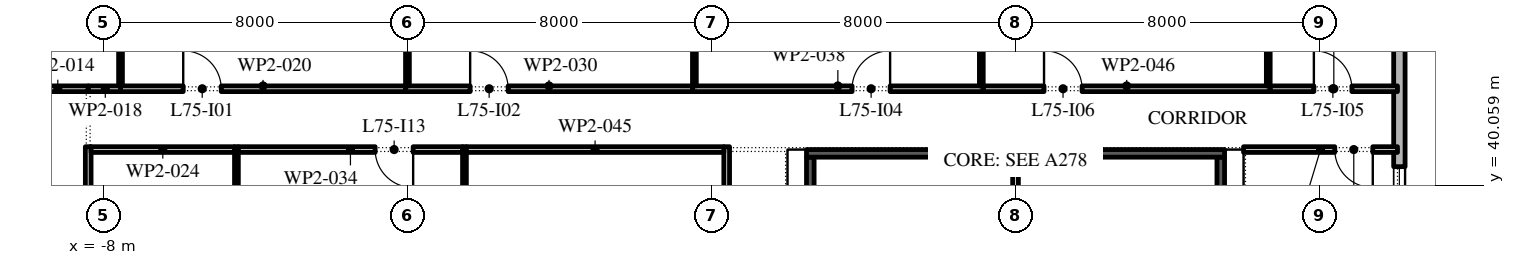
"""IFC4 building model, lengths in metres.
Left out: names, types, materials, properties, quantities, classifications, styles, units other than length and angle.
Written with IfcOpenShell. Run it as: python <this file> out.ifc"""

import sys

from ifc_helpers import new_model, si_unit, direction, frame, frame_2d, origin, place, context, subcontext, project, spatial, rectangle, extrude, element, fill, save


model = new_model("IFC4")
c1 = context("Model", 3, precision=1e-05, world=origin(), true_north=direction((0.0, 1.0)))
c2 = subcontext(c1, "Body", "Model", "MODEL_VIEW")
j1 = project(units=[si_unit("LENGTHUNIT", "METRE"), si_unit("PLANEANGLEUNIT", "RADIAN")], contexts=[c1])
p1 = place(None, origin())
s1 = spatial("IfcSite", under=j1, at=p1, CompositionType="ELEMENT")
p2 = place(p1, origin())
s2 = spatial("IfcBuilding", under=s1, at=p2, CompositionType="ELEMENT")
p3 = place(p2, frame((0.0, 0.0, 342.6)))
s3 = spatial("IfcBuildingStorey", under=s2, at=p3, CompositionType="ELEMENT", Elevation=342.6)
p4 = place(p3, frame((26.1, -2.1, 0.0), z_axis=(0.0, 0.0, 1.0), x_axis=(0.0, 1.0, 0.0)))
e1 = element("IfcWall", 1, at=p4, inside=s3, PredefinedType="STANDARD", context=c2, shape_type="SweptSolid", body=[
    extrude(rectangle(XDim=51.5, YDim=0.3, at=frame_2d((25.75, 0.0))), origin(), (0.0, 0.0, 1.0), 4.0),
])
p5 = place(p4, frame((1.3, 0.0, 0.45)))
e2 = element("IfcOpeningElement", 2, at=p5, cuts=e1, PredefinedType="OPENING", context=c2, shape_type="SweptSolid", body=[
    extrude(rectangle(XDim=4.5, YDim=3.05, at=frame_2d((2.25, 1.525))), frame((0.0, 0.16, 0.0), z_axis=(0.0, -1.0, 0.0), x_axis=(1.0, 0.0, 0.0)), (0.0, 0.0, 1.0), 0.32),
])
p6 = place(p4, frame((8.55, 0.0, 0.45)))
e3 = element("IfcOpeningElement", 3, at=p6, cuts=e1, PredefinedType="OPENING", context=c2, shape_type="SweptSolid", body=[
    extrude(rectangle(XDim=4.5, YDim=3.05, at=frame_2d((2.25, 1.525))), frame((0.0, 0.16, 0.0), z_axis=(0.0, -1.0, 0.0), x_axis=(1.0, 0.0, 0.0)), (0.0, 0.0, 1.0), 0.32),
])
p7 = place(p4, frame((17.0, 0.0, 0.0)))
e4 = element("IfcOpeningElement", 4, at=p7, cuts=e1, PredefinedType="OPENING", context=c2, shape_type="SweptSolid", body=[
    extrude(rectangle(XDim=2.4, YDim=3.5, at=frame_2d((1.2, 1.75))), frame((0.0, 0.16, 0.0), z_axis=(0.0, -1.0, 0.0), x_axis=(1.0, 0.0, 0.0)), (0.0, 0.0, 1.0), 0.32),
])
p8 = place(p4, frame((23.35, 0.0, 0.45)))
e5 = element("IfcOpeningElement", 5, at=p8, cuts=e1, PredefinedType="OPENING", context=c2, shape_type="SweptSolid", body=[
    extrude(rectangle(XDim=4.5, YDim=3.05, at=frame_2d((2.25, 1.525))), frame((0.0, 0.16, 0.0), z_axis=(0.0, -1.0, 0.0), x_axis=(1.0, 0.0, 0.0)), (0.0, 0.0, 1.0), 0.32),
])
p9 = place(p4, frame((30.75, 0.0, 0.45)))
e6 = element("IfcOpeningElement", 6, at=p9, cuts=e1, PredefinedType="OPENING", context=c2, shape_type="SweptSolid", body=[
    extrude(rectangle(XDim=4.5, YDim=3.05, at=frame_2d((2.25, 1.525))), frame((0.0, 0.16, 0.0), z_axis=(0.0, -1.0, 0.0), x_axis=(1.0, 0.0, 0.0)), (0.0, 0.0, 1.0), 0.32),
])
p10 = place(p4, frame((38.15, 0.0, 0.45)))
e7 = element("IfcOpeningElement", 7, at=p10, cuts=e1, PredefinedType="OPENING", context=c2, shape_type="SweptSolid", body=[
    extrude(rectangle(XDim=4.5, YDim=3.05, at=frame_2d((2.25, 1.525))), frame((0.0, 0.16, 0.0), z_axis=(0.0, -1.0, 0.0), x_axis=(1.0, 0.0, 0.0)), (0.0, 0.0, 1.0), 0.32),
])
p11 = place(p4, frame((46.6, 0.0, 0.0)))
e8 = element("IfcOpeningElement", 8, at=p11, cuts=e1, PredefinedType="OPENING", context=c2, shape_type="SweptSolid", body=[
    extrude(rectangle(XDim=2.4, YDim=3.5, at=frame_2d((1.2, 1.75))), frame((0.0, 0.16, 0.0), z_axis=(0.0, -1.0, 0.0), x_axis=(1.0, 0.0, 0.0)), (0.0, 0.0, 1.0), 0.32),
])
p12 = place(p3, frame((21.4, 25.75, 0.0), z_axis=(0.0, 0.0, 1.0), x_axis=(0.0, 1.0, 0.0)))
e9 = element("IfcWall", 9, at=p12, inside=s3, PredefinedType="SHEAR", context=c2, shape_type="SweptSolid", body=[
    extrude(rectangle(XDim=15.05, YDim=0.2, at=frame_2d((7.525, 0.0))), origin(), (0.0, 0.0, 1.0), 4.0),
])
p13 = place(p12, frame((7.075, 0.0, 0.0)))
e10 = element("IfcOpeningElement", 10, at=p13, cuts=e9, PredefinedType="OPENING", context=c2, shape_type="SweptSolid", body=[
    extrude(rectangle(XDim=0.9, YDim=2.1, at=frame_2d((0.45, 1.05))), frame((0.0, 0.11, 0.0), z_axis=(0.0, -1.0, 0.0), x_axis=(1.0, 0.0, 0.0)), (0.0, 0.0, 1.0), 0.22),
])
p14 = place(p3, frame((10.6, 25.75, 0.0), z_axis=(0.0, 0.0, 1.0), x_axis=(0.0, 1.0, 0.0)))
e11 = element("IfcWall", 11, at=p14, inside=s3, PredefinedType="SHEAR", context=c2, shape_type="SweptSolid", body=[
    extrude(rectangle(XDim=15.05, YDim=0.2, at=frame_2d((7.525, 0.0))), origin(), (0.0, 0.0, 1.0), 4.0),
])
p15 = place(p14, frame((3.288, 0.0, 0.0)))
e12 = element("IfcOpeningElement", 12, at=p15, cuts=e11, PredefinedType="OPENING", context=c2, shape_type="SweptSolid", body=[
    extrude(rectangle(XDim=0.9, YDim=2.1, at=frame_2d((0.45, 1.05))), frame((0.0, 0.11, 0.0), z_axis=(0.0, -1.0, 0.0), x_axis=(1.0, 0.0, 0.0)), (0.0, 0.0, 1.0), 0.22),
])
p16 = place(p14, frame((10.887, 0.0, 0.0)))
e13 = element("IfcOpeningElement", 13, at=p16, cuts=e11, PredefinedType="OPENING", context=c2, shape_type="SweptSolid", body=[
    extrude(rectangle(XDim=0.9, YDim=2.1, at=frame_2d((0.45, 1.05))), frame((0.0, 0.11, 0.0), z_axis=(0.0, -1.0, 0.0), x_axis=(1.0, 0.0, 0.0)), (0.0, 0.0, 1.0), 0.22),
])
p17 = place(p3, frame((10.5, 40.9, 0.0), z_axis=(0.0, 0.0, 1.0), x_axis=(1.0, 0.0, 0.0)))
e14 = element("IfcWall", 14, at=p17, inside=s3, PredefinedType="SHEAR", context=c2, shape_type="SweptSolid", body=[
    extrude(rectangle(XDim=11.0, YDim=0.2, at=frame_2d((5.5, 0.0))), origin(), (0.0, 0.0, 1.0), 4.0),
])
p18 = place(p3, frame((16.0, 25.75, 0.0), z_axis=(0.0, 0.0, 1.0), x_axis=(0.0, 1.0, 0.0)))
e15 = element("IfcWall", 15, at=p18, inside=s3, PredefinedType="PARTITIONING", context=c2, shape_type="SweptSolid", body=[
    extrude(rectangle(XDim=15.05, YDim=0.15, at=frame_2d((7.525, 0.0))), origin(), (0.0, 0.0, 1.0), 4.0),
])
p19 = place(p3, frame((-10.0, 42.6, 0.0), z_axis=(0.0, 0.0, 1.0), x_axis=(1.0, 0.0, 0.0)))
e16 = element("IfcWall", 16, at=p19, inside=s3, PredefinedType="PARTITIONING", context=c2, shape_type="SweptSolid", body=[
    extrude(rectangle(XDim=1.6, YDim=0.15, at=frame_2d((0.8, 0.0))), origin(), (0.0, 0.0, 1.0), 4.0),
])
p20 = place(p3, frame((-8.4, 41.075, 0.0), z_axis=(0.0, 0.0, 1.0), x_axis=(0.0, -1.0, 0.0)))
e17 = element("IfcWall", 17, at=p20, inside=s3, PredefinedType="PARTITIONING", context=c2, shape_type="SweptSolid", body=[
    extrude(rectangle(XDim=9.025, YDim=0.15, at=frame_2d((4.512, 0.0))), origin(), (0.0, 0.0, 1.0), 4.0),
])
p21 = place(p20, frame((2.175, 0.0, 0.0)))
e18 = element("IfcOpeningElement", 18, at=p21, cuts=e17, PredefinedType="OPENING", context=c2, shape_type="SweptSolid", body=[
    extrude(rectangle(XDim=1.0, YDim=2.1, at=frame_2d((0.5, 1.05))), frame((0.0, 0.085, 0.0), z_axis=(0.0, -1.0, 0.0), x_axis=(1.0, 0.0, 0.0)), (0.0, 0.0, 1.0), 0.17),
])
p22 = place(p3, frame((-8.4, 42.6, 0.0), z_axis=(0.0, 0.0, 1.0), x_axis=(1.0, 0.0, 0.0)))
e19 = element("IfcWall", 19, at=p22, inside=s3, PredefinedType="PARTITIONING", context=c2, shape_type="SweptSolid", body=[
    extrude(rectangle(XDim=0.9, YDim=0.15, at=frame_2d((0.45, 0.0))), origin(), (0.0, 0.0, 1.0), 4.0),
])
p23 = place(p3, frame((-7.55, 42.675, 0.0), z_axis=(0.0, 0.0, 1.0), x_axis=(0.0, 1.0, 0.0)))
e20 = element("IfcWall", 20, at=p23, inside=s3, PredefinedType="PARTITIONING", context=c2, shape_type="SweptSolid", body=[
    extrude(rectangle(XDim=4.775, YDim=0.1, at=frame_2d((2.387, 0.0))), origin(), (0.0, 0.0, 1.0), 3.096),
])
p24 = place(p3, frame((-7.55, 42.6, 0.0), z_axis=(0.0, 0.0, 1.0), x_axis=(1.0, 0.0, 0.0)))
e21 = element("IfcWall", 21, at=p24, inside=s3, PredefinedType="PARTITIONING", context=c2, shape_type="SweptSolid", body=[
    extrude(rectangle(XDim=7.5, YDim=0.15, at=frame_2d((3.75, 0.0))), origin(), (0.0, 0.0, 1.0), 4.0),
])
p25 = place(p24, frame((1.65, 0.0, 0.0)))
e22 = element("IfcOpeningElement", 22, at=p25, cuts=e21, PredefinedType="OPENING", context=c2, shape_type="SweptSolid", body=[
    extrude(rectangle(XDim=1.0, YDim=2.1, at=frame_2d((0.5, 1.05))), frame((0.0, 0.085, 0.0), z_axis=(0.0, -1.0, 0.0), x_axis=(1.0, 0.0, 0.0)), (0.0, 0.0, 1.0), 0.17),
])
p26 = place(p3, frame((-4.5, 32.05, 0.0), z_axis=(0.0, 0.0, 1.0), x_axis=(0.0, 1.0, 0.0)))
e23 = element("IfcWall", 23, at=p26, inside=s3, PredefinedType="PARTITIONING", context=c2, shape_type="SweptSolid", body=[
    extrude(rectangle(XDim=9.025, YDim=0.1, at=frame_2d((4.512, 0.0))), origin(), (0.0, 0.0, 1.0), 4.0),
])
p27 = place(p3, frame((-4.55, 41.0, 0.0), z_axis=(0.0, 0.0, 1.0), x_axis=(-1.0, 0.0, 0.0)))
e24 = element("IfcWall", 24, at=p27, inside=s3, PredefinedType="PARTITIONING", context=c2, shape_type="SweptSolid", body=[
    extrude(rectangle(XDim=3.775, YDim=0.15, at=frame_2d((1.887, 0.0))), origin(), (0.0, 0.0, 1.0), 4.0),
])
p28 = place(p3, frame((-0.05, 42.6, 0.0), z_axis=(0.0, 0.0, 1.0), x_axis=(1.0, 0.0, 0.0)))
e25 = element("IfcWall", 25, at=p28, inside=s3, PredefinedType="PARTITIONING", context=c2, shape_type="SweptSolid", body=[
    extrude(rectangle(XDim=7.55, YDim=0.15, at=frame_2d((3.775, 0.0))), origin(), (0.0, 0.0, 1.0), 4.0),
])
p29 = place(p28, frame((1.7, 0.0, 0.0)))
e26 = element("IfcOpeningElement", 26, at=p29, cuts=e25, PredefinedType="OPENING", context=c2, shape_type="SweptSolid", body=[
    extrude(rectangle(XDim=1.0, YDim=2.1, at=frame_2d((0.5, 1.05))), frame((0.0, 0.085, 0.0), z_axis=(0.0, -1.0, 0.0), x_axis=(1.0, 0.0, 0.0)), (0.0, 0.0, 1.0), 0.17),
])
p30 = place(p3, frame((0.0, 52.8, 0.0), z_axis=(0.0, 0.0, 1.0), x_axis=(0.0, -1.0, 0.0)))
e27 = element("IfcWall", 27, at=p30, inside=s3, PredefinedType="PARTITIONING", context=c2, shape_type="SweptSolid", body=[
    extrude(rectangle(XDim=10.125, YDim=0.1, at=frame_2d((5.062, 0.0))), origin(), (0.0, 0.0, 1.0), 4.0),
])
p31 = place(p3, frame((1.5, 32.05, 0.0), z_axis=(0.0, 0.0, 1.0), x_axis=(0.0, 1.0, 0.0)))
e28 = element("IfcWall", 28, at=p31, inside=s3, PredefinedType="PARTITIONING", context=c2, shape_type="SweptSolid", body=[
    extrude(rectangle(XDim=9.025, YDim=0.1, at=frame_2d((4.512, 0.0))), origin(), (0.0, 0.0, 1.0), 4.0),
])
p32 = place(p3, frame((1.45, 41.0, 0.0), z_axis=(0.0, 0.0, 1.0), x_axis=(-1.0, 0.0, 0.0)))
e29 = element("IfcWall", 29, at=p32, inside=s3, PredefinedType="PARTITIONING", context=c2, shape_type="SweptSolid", body=[
    extrude(rectangle(XDim=5.9, YDim=0.15, at=frame_2d((2.95, 0.0))), origin(), (0.0, 0.0, 1.0), 4.0),
])
p33 = place(p32, frame((1.3, 0.0, 0.0)))
e30 = element("IfcOpeningElement", 30, at=p33, cuts=e29, PredefinedType="OPENING", context=c2, shape_type="SweptSolid", body=[
    extrude(rectangle(XDim=1.0, YDim=2.1, at=frame_2d((0.5, 1.05))), frame((0.0, 0.085, 0.0), z_axis=(0.0, -1.0, 0.0), x_axis=(1.0, 0.0, 0.0)), (0.0, 0.0, 1.0), 0.17),
])
p34 = place(p3, frame((7.5, 42.6, 0.0), z_axis=(0.0, 0.0, 1.0), x_axis=(1.0, 0.0, 0.0)))
e31 = element("IfcWall", 31, at=p34, inside=s3, PredefinedType="PARTITIONING", context=c2, shape_type="SweptSolid", body=[
    extrude(rectangle(XDim=7.65, YDim=0.15, at=frame_2d((3.825, 0.0))), origin(), (0.0, 0.0, 1.0), 4.0),
])
p35 = place(p34, frame((4.2, 0.0, 0.0)))
e32 = element("IfcOpeningElement", 32, at=p35, cuts=e31, PredefinedType="OPENING", context=c2, shape_type="SweptSolid", body=[
    extrude(rectangle(XDim=1.0, YDim=2.1, at=frame_2d((0.5, 1.05))), frame((0.0, 0.085, 0.0), z_axis=(0.0, -1.0, 0.0), x_axis=(1.0, 0.0, 0.0)), (0.0, 0.0, 1.0), 0.17),
])
p36 = place(p3, frame((7.55, 45.95, 0.0), z_axis=(0.0, 0.0, 1.0), x_axis=(0.0, -1.0, 0.0)))
e33 = element("IfcWall", 33, at=p36, inside=s3, PredefinedType="PARTITIONING", context=c2, shape_type="SweptSolid", body=[
    extrude(rectangle(XDim=3.275, YDim=0.1, at=frame_2d((1.637, 0.0))), origin(), (0.0, 0.0, 1.0), 3.096),
])
p37 = place(p3, frame((8.4, 32.0, 0.0), z_axis=(0.0, 0.0, 1.0), x_axis=(0.0, 1.0, 0.0)))
e34 = element("IfcWall", 34, at=p37, inside=s3, PredefinedType="PARTITIONING", context=c2, shape_type="SweptSolid", body=[
    extrude(rectangle(XDim=9.075, YDim=0.15, at=frame_2d((4.538, 0.0))), origin(), (0.0, 0.0, 1.0), 4.0),
])
p38 = place(p37, frame((3.1, 0.0, 0.0)))
e35 = element("IfcOpeningElement", 35, at=p38, cuts=e34, PredefinedType="OPENING", context=c2, shape_type="SweptSolid", body=[
    extrude(rectangle(XDim=1.0, YDim=2.1, at=frame_2d((0.5, 1.05))), frame((0.0, 0.085, 0.0), z_axis=(0.0, -1.0, 0.0), x_axis=(1.0, 0.0, 0.0)), (0.0, 0.0, 1.0), 0.17),
])
p39 = place(p3, frame((8.325, 41.0, 0.0), z_axis=(0.0, 0.0, 1.0), x_axis=(-1.0, 0.0, 0.0)))
e36 = element("IfcWall", 36, at=p39, inside=s3, PredefinedType="PARTITIONING", context=c2, shape_type="SweptSolid", body=[
    extrude(rectangle(XDim=6.775, YDim=0.15, at=frame_2d((3.387, 0.0))), origin(), (0.0, 0.0, 1.0), 4.0),
])
p40 = place(p3, frame((15.15, 42.6, 0.0), z_axis=(0.0, 0.0, 1.0), x_axis=(1.0, 0.0, 0.0)))
e37 = element("IfcWall", 37, at=p40, inside=s3, PredefinedType="PARTITIONING", context=c2, shape_type="SweptSolid", body=[
    extrude(rectangle(XDim=7.55, YDim=0.15, at=frame_2d((3.775, 0.0))), origin(), (0.0, 0.0, 1.0), 4.0),
])
p41 = place(p40, frame((1.6, 0.0, 0.0)))
e38 = element("IfcOpeningElement", 38, at=p41, cuts=e37, PredefinedType="OPENING", context=c2, shape_type="SweptSolid", body=[
    extrude(rectangle(XDim=1.0, YDim=2.1, at=frame_2d((0.5, 1.05))), frame((0.0, 0.085, 0.0), z_axis=(0.0, -1.0, 0.0), x_axis=(1.0, 0.0, 0.0)), (0.0, 0.0, 1.0), 0.17),
])
p42 = place(p3, frame((15.1, 45.95, 0.0), z_axis=(0.0, 0.0, 1.0), x_axis=(0.0, -1.0, 0.0)))
e39 = element("IfcWall", 39, at=p42, inside=s3, PredefinedType="PARTITIONING", context=c2, shape_type="SweptSolid", body=[
    extrude(rectangle(XDim=3.275, YDim=0.1, at=frame_2d((1.637, 0.0))), origin(), (0.0, 0.0, 1.0), 4.0),
])
p43 = place(p3, frame((22.65, 42.675, 0.0), z_axis=(0.0, 0.0, 1.0), x_axis=(0.0, 1.0, 0.0)))
e40 = element("IfcWall", 40, at=p43, inside=s3, PredefinedType="PARTITIONING", context=c2, shape_type="SweptSolid", body=[
    extrude(rectangle(XDim=6.735, YDim=0.1, at=frame_2d((3.367, 0.0))), origin(), (0.0, 0.0, 1.0), 4.0),
])
p44 = place(p3, frame((22.7, 42.6, 0.0), z_axis=(0.0, 0.0, 1.0), x_axis=(1.0, 0.0, 0.0)))
e41 = element("IfcWall", 41, at=p44, inside=s3, PredefinedType="PARTITIONING", context=c2, shape_type="SweptSolid", body=[
    extrude(rectangle(XDim=3.35, YDim=0.15, at=frame_2d((1.675, 0.0))), origin(), (0.0, 0.0, 1.0), 4.0),
])
p45 = place(p44, frame((1.15, 0.0, 0.0)))
e42 = element("IfcOpeningElement", 42, at=p45, cuts=e41, PredefinedType="OPENING", context=c2, shape_type="SweptSolid", body=[
    extrude(rectangle(XDim=1.0, YDim=2.1, at=frame_2d((0.5, 1.05))), frame((0.0, 0.085, 0.0), z_axis=(0.0, -1.0, 0.0), x_axis=(1.0, 0.0, 0.0)), (0.0, 0.0, 1.0), 0.17),
])
p46 = place(p3, frame((26.05, 41.0, 0.0), z_axis=(0.0, 0.0, 1.0), x_axis=(-1.0, 0.0, 0.0)))
e43 = element("IfcWall", 43, at=p46, inside=s3, PredefinedType="PARTITIONING", context=c2, shape_type="SweptSolid", body=[
    extrude(rectangle(XDim=4.05, YDim=0.15, at=frame_2d((2.025, 0.0))), origin(), (0.0, 0.0, 1.0), 4.0),
])
p47 = place(p46, frame((0.65, 0.0, 0.0)))
e44 = element("IfcOpeningElement", 44, at=p47, cuts=e43, PredefinedType="OPENING", context=c2, shape_type="SweptSolid", body=[
    extrude(rectangle(XDim=1.0, YDim=2.1, at=frame_2d((0.5, 1.05))), frame((0.0, 0.085, 0.0), z_axis=(0.0, -1.0, 0.0), x_axis=(1.0, 0.0, 0.0)), (0.0, 0.0, 1.0), 0.17),
])
p48 = place(p10, origin())
e45 = element("IfcWindow", 45, at=p48, inside=s3, PartitioningType="DOUBLE_PANEL_VERTICAL", PredefinedType="WINDOW", context=c2, shape_type="SweptSolid", body=[
    extrude(rectangle(XDim=4.5, YDim=3.05, at=frame_2d((2.25, 1.525))), frame((0.0, 0.03, 0.0), z_axis=(0.0, -1.0, 0.0), x_axis=(1.0, 0.0, 0.0)), (0.0, 0.0, 1.0), 0.06),
])
fill(e7, e45)
p49 = place(p25, origin())
e46 = element("IfcDoor", 46, at=p49, inside=s3, OperationType="SINGLE_SWING_RIGHT", PredefinedType="DOOR", context=c2, shape_type="SweptSolid", body=[
    extrude(rectangle(XDim=1.0, YDim=2.1, at=frame_2d((0.5, 1.05))), frame((0.0, 0.025, 0.0), z_axis=(0.0, -1.0, 0.0), x_axis=(1.0, 0.0, 0.0)), (0.0, 0.0, 1.0), 0.05),
])
fill(e22, e46)
p50 = place(p29, origin())
e47 = element("IfcDoor", 47, at=p50, inside=s3, OperationType="SINGLE_SWING_RIGHT", PredefinedType="DOOR", context=c2, shape_type="SweptSolid", body=[
    extrude(rectangle(XDim=1.0, YDim=2.1, at=frame_2d((0.5, 1.05))), frame((0.0, 0.025, 0.0), z_axis=(0.0, -1.0, 0.0), x_axis=(1.0, 0.0, 0.0)), (0.0, 0.0, 1.0), 0.05),
])
fill(e26, e47)
p51 = place(p35, origin())
e48 = element("IfcDoor", 48, at=p51, inside=s3, OperationType="SINGLE_SWING_LEFT", PredefinedType="DOOR", context=c2, shape_type="SweptSolid", body=[
    extrude(rectangle(XDim=1.0, YDim=2.1, at=frame_2d((0.5, 1.05))), frame((0.0, 0.025, 0.0), z_axis=(0.0, -1.0, 0.0), x_axis=(1.0, 0.0, 0.0)), (0.0, 0.0, 1.0), 0.05),
])
fill(e32, e48)
p52 = place(p45, origin())
e49 = element("IfcDoor", 49, at=p52, inside=s3, OperationType="SINGLE_SWING_RIGHT", PredefinedType="DOOR", context=c2, shape_type="SweptSolid", body=[
    extrude(rectangle(XDim=1.0, YDim=2.1, at=frame_2d((0.5, 1.05))), frame((0.0, 0.025, 0.0), z_axis=(0.0, -1.0, 0.0), x_axis=(1.0, 0.0, 0.0)), (0.0, 0.0, 1.0), 0.05),
])
fill(e42, e49)
p53 = place(p41, origin())
e50 = element("IfcDoor", 50, at=p53, inside=s3, OperationType="SINGLE_SWING_RIGHT", PredefinedType="DOOR", context=c2, shape_type="SweptSolid", body=[
    extrude(rectangle(XDim=1.0, YDim=2.1, at=frame_2d((0.5, 1.05))), frame((0.0, 0.025, 0.0), z_axis=(0.0, -1.0, 0.0), x_axis=(1.0, 0.0, 0.0)), (0.0, 0.0, 1.0), 0.05),
])
fill(e38, e50)
p54 = place(p33, origin())
e51 = element("IfcDoor", 51, at=p54, inside=s3, OperationType="SINGLE_SWING_RIGHT", PredefinedType="DOOR", context=c2, shape_type="SweptSolid", body=[
    extrude(rectangle(XDim=1.0, YDim=2.1, at=frame_2d((0.5, 1.05))), frame((0.0, 0.025, 0.0), z_axis=(0.0, -1.0, 0.0), x_axis=(1.0, 0.0, 0.0)), (0.0, 0.0, 1.0), 0.05),
])
fill(e30, e51)
p55 = place(p47, origin())
e52 = element("IfcDoor", 52, at=p55, inside=s3, OperationType="SINGLE_SWING_RIGHT", PredefinedType="DOOR", context=c2, shape_type="SweptSolid", body=[
    extrude(rectangle(XDim=1.0, YDim=2.1, at=frame_2d((0.5, 1.05))), frame((0.0, 0.025, 0.0), z_axis=(0.0, -1.0, 0.0), x_axis=(1.0, 0.0, 0.0)), (0.0, 0.0, 1.0), 0.05),
])
fill(e44, e52)
save(model, sys.argv[1])
